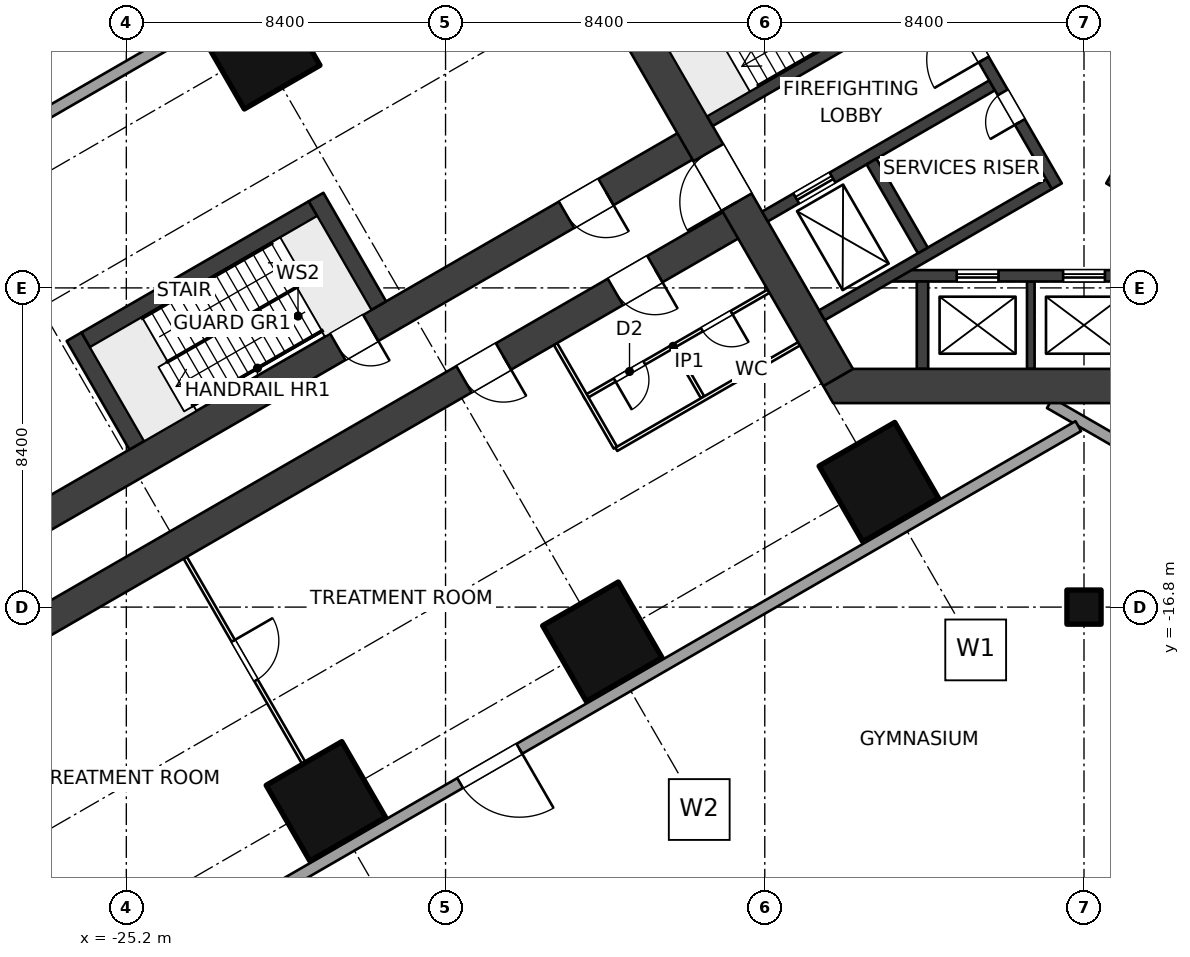
"""IFC4 building model, lengths in metres.
Left out: names, types, materials, properties, quantities, classifications, styles, units other than length and angle.
Written with IfcOpenShell. Run it as: python <this file> out.ifc"""

import sys

from ifc_helpers import new_model, si_unit, direction, frame, frame_2d, origin, origin_2d, place, context, subcontext, project, spatial, polyline, rectangle, outline, extrude, element, fill, save


model = new_model("IFC4")
c1 = context("Model", 3, precision=1e-05, world=origin(), true_north=direction((0.0, 1.0)))
c2 = subcontext(c1, "Body", "Model", "MODEL_VIEW")
j1 = project(units=[si_unit("LENGTHUNIT", "METRE"), si_unit("PLANEANGLEUNIT", "RADIAN")], contexts=[c1])
p1 = place(None, origin())
s1 = spatial("IfcSite", under=j1, at=p1, CompositionType="ELEMENT")
p2 = place(p1, origin())
s2 = spatial("IfcBuilding", under=s1, at=p2, CompositionType="ELEMENT")
p3 = place(p2, frame((0.0, 0.0, 11.0)))
s3 = spatial("IfcBuildingStorey", under=s2, at=p3, CompositionType="ELEMENT", Elevation=11.0)
for number, where, z_axis, x_axis in (
    (1, (-5.4, -13.51, 0.0), (0.0, 0.0, 1.0), (-0.5, 0.866, 0.0)),
    (2, (-12.675, -17.71, 0.0), (0.0, 0.0, 1.0), (-0.5, 0.866, 0.0)),
    (3, (-21.675, -2.122, 0.0), (0.0, 0.0, 1.0), (-0.5, 0.866, 0.0)),
    (4, (-19.949, -21.91, 0.0), (0.0, 0.0, 1.0), (-0.5, 0.866, 0.0)),
):
    element("IfcColumn", number, at=place(p3, frame(where, z_axis=z_axis, x_axis=x_axis)), inside=s3, PredefinedType="COLUMN", context=c2, shape_type="SweptSolid", body=[
        extrude(rectangle(XDim=2.3, YDim=2.3, at=origin_2d()), origin(), (0.0, 0.0, 1.0), 5.0),
    ])
p4 = place(p3, frame((0.0, -16.8, 0.0), z_axis=(0.0, 0.0, 1.0), x_axis=(1.0, 0.0, 0.0)))
e5 = element("IfcColumn", 5, at=p4, inside=s3, PredefinedType="COLUMN", context=c2, shape_type="SweptSolid", body=[
    extrude(rectangle(XDim=0.9, YDim=0.9, at=origin_2d()), origin(), (0.0, 0.0, 1.0), 5.0),
])
p5 = place(p3, frame((-6.47, -10.757, 0.0), z_axis=(0.0, 0.0, 1.0), x_axis=(-0.499997612506, 0.8660267822, 0.0)))
e6 = element("IfcWall", 6, at=p5, inside=s3, PredefinedType="SHEAR", context=c2, shape_type="SweptSolid", body=[
    extrude(rectangle(XDim=12.161, YDim=0.9, at=frame_2d((6.08, 0.0))), origin(), (0.0, 0.0, 1.0), 5.0),
])
p6 = place(p5, frame((5.33, 0.0, 0.0)))
e7 = element("IfcOpeningElement", 7, at=p6, cuts=e6, PredefinedType="OPENING", context=c2, shape_type="SweptSolid", body=[
    extrude(rectangle(XDim=1.5, YDim=2.1, at=frame_2d((0.75, 1.05))), frame((0.0, 0.46, 0.0), z_axis=(0.0, -1.0, 0.0), x_axis=(1.0, 0.0, 0.0)), (0.0, 0.0, 1.0), 0.92),
])
p7 = place(p3, origin())
e8 = element("IfcWall", 8, at=p7, inside=s3, PredefinedType="SHEAR", context=c2, shape_type="SweptSolid", body=[
    extrude(outline(polyline([(-6.6, -11.432), (6.6, -11.432), (6.86, -10.981), (6.08, -10.531), (-6.08, -10.531), (-6.86, -10.981), (-6.6, -11.432)])), origin(), (0.0, 0.0, 1.0), 5.0),
])
p8 = place(p3, frame((-0.714, -5.724, 0.0), z_axis=(0.0, 0.0, 1.0), x_axis=(-0.499995050369, 0.866028261437, 0.0)))
e9 = element("IfcWall", 9, at=p8, inside=s3, PredefinedType="SHEAR", context=c2, shape_type="SweptSolid", body=[
    extrude(rectangle(XDim=9.2, YDim=0.3, at=frame_2d((4.6, 0.0))), origin(), (0.0, 0.0, 1.0), 5.0),
])
p9 = place(p8, frame((3.85, 0.0, 0.0)))
e10 = element("IfcOpeningElement", 10, at=p9, cuts=e9, PredefinedType="OPENING", context=c2, shape_type="SweptSolid", body=[
    extrude(rectangle(XDim=1.5, YDim=2.1, at=frame_2d((0.75, 1.05))), frame((0.0, 0.16, 0.0), z_axis=(0.0, -1.0, 0.0), x_axis=(1.0, 0.0, 0.0)), (0.0, 0.0, 1.0), 0.32),
])
p10 = place(p8, frame((1.95, 0.0, 0.0)))
e11 = element("IfcOpeningElement", 11, at=p10, cuts=e9, PredefinedType="OPENING", context=c2, shape_type="SweptSolid", body=[
    extrude(rectangle(XDim=0.9, YDim=2.1, at=frame_2d((0.45, 1.05))), frame((0.0, 0.16, 0.0), z_axis=(0.0, -1.0, 0.0), x_axis=(1.0, 0.0, 0.0)), (0.0, 0.0, 1.0), 0.32),
])
p11 = place(p3, frame((-3.869, -0.559, 0.0), z_axis=(0.0, 0.0, 1.0), x_axis=(-0.86602711848, -0.499997030048, 0.0)))
e12 = element("IfcWall", 12, at=p11, inside=s3, PredefinedType="SHEAR", context=c2, shape_type="SweptSolid", body=[
    extrude(rectangle(XDim=6.901, YDim=0.3, at=frame_2d((3.451, 0.0))), origin(), (0.0, 0.0, 1.0), 5.0),
])
p12 = place(p11, frame((0.25, 0.0, 0.0)))
e13 = element("IfcOpeningElement", 13, at=p12, cuts=e12, PredefinedType="OPENING", context=c2, shape_type="SweptSolid", body=[
    extrude(rectangle(XDim=1.0, YDim=2.1, at=frame_2d((0.5, 1.05))), frame((0.0, 0.16, 0.0), z_axis=(0.0, -1.0, 0.0), x_axis=(1.0, 0.0, 0.0)), (0.0, 0.0, 1.0), 0.32),
])
p13 = place(p3, frame((-2.419, -3.071, 0.0), z_axis=(0.0, 0.0, 1.0), x_axis=(-0.86602711848, -0.499997030048, 0.0)))
e14 = element("IfcWall", 14, at=p13, inside=s3, PredefinedType="SHEAR", context=c2, shape_type="SweptSolid", body=[
    extrude(rectangle(XDim=6.901, YDim=0.3, at=frame_2d((3.451, 0.0))), origin(), (0.0, 0.0, 1.0), 5.0),
])
p14 = place(p13, frame((4.85, 0.0, 0.0)))
e15 = element("IfcOpeningElement", 15, at=p14, cuts=e14, PredefinedType="OPENING", context=c2, shape_type="SweptSolid", body=[
    extrude(rectangle(XDim=1.1, YDim=2.1, at=frame_2d((0.55, 1.05))), frame((0.0, 0.16, 0.0), z_axis=(0.0, -1.0, 0.0), x_axis=(1.0, 0.0, 0.0)), (0.0, 0.0, 1.0), 0.32),
])
p15 = place(p3, frame((-0.919, -5.669, 0.0), z_axis=(0.0, 0.0, 1.0), x_axis=(-0.866011800373, -0.500023561059, 0.0)))
e16 = element("IfcWall", 16, at=p15, inside=s3, PredefinedType="SHEAR", context=c2, shape_type="SweptSolid", body=[
    extrude(rectangle(XDim=6.902, YDim=0.3, at=frame_2d((3.451, 0.0))), origin(), (0.0, 0.0, 1.0), 5.0),
])
p16 = place(p3, frame((-4.241, -7.414, 0.0), z_axis=(0.0, 0.0, 1.0), x_axis=(-0.500048589285, 0.86599734893, 0.0)))
e17 = element("IfcWall", 17, at=p16, inside=s3, PredefinedType="SHEAR", context=c2, shape_type="SweptSolid", body=[
    extrude(rectangle(XDim=2.7, YDim=0.3, at=frame_2d((1.35, 0.0))), origin(), (0.0, 0.0, 1.0), 5.0),
])
p17 = place(p3, frame((5.314, 2.244, 0.0), z_axis=(0.0, 0.0, 1.0), x_axis=(-0.499995050369, -0.866028261437, 0.0)))
e18 = element("IfcWall", 18, at=p17, inside=s3, PredefinedType="SHEAR", context=c2, shape_type="SweptSolid", body=[
    extrude(rectangle(XDim=9.2, YDim=0.3, at=frame_2d((4.6, 0.0))), origin(), (0.0, 0.0, 1.0), 5.0),
])
p18 = place(p17, frame((3.85, 0.0, 0.0)))
e19 = element("IfcOpeningElement", 19, at=p18, cuts=e18, PredefinedType="OPENING", context=c2, shape_type="SweptSolid", body=[
    extrude(rectangle(XDim=1.5, YDim=2.1, at=frame_2d((0.75, 1.05))), frame((0.0, 0.16, 0.0), z_axis=(0.0, -1.0, 0.0), x_axis=(1.0, 0.0, 0.0)), (0.0, 0.0, 1.0), 0.32),
])
p19 = place(p17, frame((1.95, 0.0, 0.0)))
e20 = element("IfcOpeningElement", 20, at=p19, cuts=e18, PredefinedType="OPENING", context=c2, shape_type="SweptSolid", body=[
    extrude(rectangle(XDim=0.9, YDim=2.1, at=frame_2d((0.45, 1.05))), frame((0.0, 0.16, 0.0), z_axis=(0.0, -1.0, 0.0), x_axis=(1.0, 0.0, 0.0)), (0.0, 0.0, 1.0), 0.32),
])
p20 = place(p3, frame((5.098, -8.082, 0.0), z_axis=(0.0, 0.0, 1.0), x_axis=(-1.0, 0.0, 0.0)))
e21 = element("IfcWall", 21, at=p20, inside=s3, PredefinedType="SHEAR", context=c2, shape_type="SweptSolid", body=[
    extrude(rectangle(XDim=10.195, YDim=0.3, at=frame_2d((5.098, 0.0))), origin(), (0.0, 0.0, 1.0), 5.0),
])
p21 = place(p20, frame((1.748, 0.0, 0.0)))
e22 = element("IfcOpeningElement", 22, at=p21, cuts=e21, PredefinedType="OPENING", context=c2, shape_type="SweptSolid", body=[
    extrude(rectangle(XDim=1.1, YDim=2.1, at=frame_2d((0.55, 1.05))), frame((0.0, 0.16, 0.0), z_axis=(0.0, -1.0, 0.0), x_axis=(1.0, 0.0, 0.0)), (0.0, 0.0, 1.0), 0.32),
])
p22 = place(p20, frame((4.548, 0.0, 0.0)))
e23 = element("IfcOpeningElement", 23, at=p22, cuts=e21, PredefinedType="OPENING", context=c2, shape_type="SweptSolid", body=[
    extrude(rectangle(XDim=1.1, YDim=2.1, at=frame_2d((0.55, 1.05))), frame((0.0, 0.16, 0.0), z_axis=(0.0, -1.0, 0.0), x_axis=(1.0, 0.0, 0.0)), (0.0, 0.0, 1.0), 0.32),
])
p23 = place(p20, frame((7.348, 0.0, 0.0)))
e24 = element("IfcOpeningElement", 24, at=p23, cuts=e21, PredefinedType="OPENING", context=c2, shape_type="SweptSolid", body=[
    extrude(rectangle(XDim=1.1, YDim=2.1, at=frame_2d((0.55, 1.05))), frame((0.0, 0.16, 0.0), z_axis=(0.0, -1.0, 0.0), x_axis=(1.0, 0.0, 0.0)), (0.0, 0.0, 1.0), 0.32),
])
p24 = place(p3, frame((-4.25, -8.231, 0.0), z_axis=(0.0, 0.0, 1.0), x_axis=(0.0, -1.0, 0.0)))
e25 = element("IfcWall", 25, at=p24, inside=s3, PredefinedType="SHEAR", context=c2, shape_type="SweptSolid", body=[
    extrude(rectangle(XDim=2.3, YDim=0.3, at=frame_2d((1.15, 0.0))), origin(), (0.0, 0.0, 1.0), 5.0),
])
p25 = place(p3, frame((-1.4, -8.231, 0.0), z_axis=(0.0, 0.0, 1.0), x_axis=(0.0, -1.0, 0.0)))
e26 = element("IfcWall", 26, at=p25, inside=s3, PredefinedType="SHEAR", context=c2, shape_type="SweptSolid", body=[
    extrude(rectangle(XDim=2.3, YDim=0.2, at=frame_2d((1.15, 0.0))), origin(), (0.0, 0.0, 1.0), 5.0),
])
p26 = place(p3, frame((-8.91, -6.53, 0.0), z_axis=(0.0, 0.0, 1.0), x_axis=(-0.866024404313, -0.500001731131, 0.0)))
e27 = element("IfcWall", 27, at=p26, inside=s3, PredefinedType="SHEAR", context=c2, shape_type="SweptSolid", body=[
    extrude(rectangle(XDim=36.953, YDim=0.8, at=frame_2d((18.477, 0.0))), origin(), (0.0, 0.0, 1.0), 5.0),
])
p27 = place(p26, frame((2.75, 0.0, 0.0)))
e28 = element("IfcOpeningElement", 28, at=p27, cuts=e27, PredefinedType="OPENING", context=c2, shape_type="SweptSolid", body=[
    extrude(rectangle(XDim=1.2, YDim=2.1, at=frame_2d((0.6, 1.05))), frame((0.0, 0.41, 0.0), z_axis=(0.0, -1.0, 0.0), x_axis=(1.0, 0.0, 0.0)), (0.0, 0.0, 1.0), 0.82),
])
p28 = place(p26, frame((7.35, 0.0, 0.0)))
e29 = element("IfcOpeningElement", 29, at=p28, cuts=e27, PredefinedType="OPENING", context=c2, shape_type="SweptSolid", body=[
    extrude(rectangle(XDim=1.2, YDim=2.1, at=frame_2d((0.6, 1.05))), frame((0.0, 0.41, 0.0), z_axis=(0.0, -1.0, 0.0), x_axis=(1.0, 0.0, 0.0)), (0.0, 0.0, 1.0), 0.82),
])
p29 = place(p3, frame((-10.11, -4.451, 0.0), z_axis=(0.0, 0.0, 1.0), x_axis=(-0.866025284237, -0.500000207062, 0.0)))
e30 = element("IfcWall", 30, at=p29, inside=s3, PredefinedType="SHEAR", context=c2, shape_type="SweptSolid", body=[
    extrude(rectangle(XDim=36.75, YDim=0.8, at=frame_2d((18.375, 0.0))), origin(), (0.0, 0.0, 1.0), 5.0),
])
p30 = place(p29, frame((10.0, 0.0, 0.0)))
e31 = element("IfcOpeningElement", 31, at=p30, cuts=e30, PredefinedType="OPENING", context=c2, shape_type="SweptSolid", body=[
    extrude(rectangle(XDim=1.0, YDim=2.1, at=frame_2d((0.5, 1.05))), frame((0.0, 0.41, 0.0), z_axis=(0.0, -1.0, 0.0), x_axis=(1.0, 0.0, 0.0)), (0.0, 0.0, 1.0), 0.82),
])
p31 = place(p29, frame((2.85, 0.0, 0.0)))
e32 = element("IfcOpeningElement", 32, at=p31, cuts=e30, PredefinedType="OPENING", context=c2, shape_type="SweptSolid", body=[
    extrude(rectangle(XDim=1.2, YDim=2.1, at=frame_2d((0.6, 1.05))), frame((0.0, 0.41, 0.0), z_axis=(0.0, -1.0, 0.0), x_axis=(1.0, 0.0, 0.0)), (0.0, 0.0, 1.0), 0.82),
])
p32 = place(p3, frame((-8.3, -8.487, 0.0), z_axis=(0.0, 0.0, 1.0), x_axis=(-0.866015695474, -0.500016814911, 0.0)))
e33 = element("IfcWall", 33, at=p32, inside=s3, PredefinedType="PARTITIONING", context=c2, shape_type="SweptSolid", body=[
    extrude(rectangle(XDim=5.6, YDim=0.1, at=frame_2d((2.8, 0.0))), origin(), (0.0, 0.0, 1.0), 4.7),
])
p33 = place(p32, frame((1.125, 0.0, 0.0)))
e34 = element("IfcOpeningElement", 34, at=p33, cuts=e33, PredefinedType="OPENING", context=c2, shape_type="SweptSolid", body=[
    extrude(rectangle(XDim=0.9, YDim=2.1, at=frame_2d((0.45, 1.05))), frame((0.0, 0.06, 0.0), z_axis=(0.0, -1.0, 0.0), x_axis=(1.0, 0.0, 0.0)), (0.0, 0.0, 1.0), 0.12),
])
p34 = place(p32, frame((3.775, 0.0, 0.0)))
e35 = element("IfcOpeningElement", 35, at=p34, cuts=e33, PredefinedType="OPENING", context=c2, shape_type="SweptSolid", body=[
    extrude(rectangle(XDim=0.9, YDim=2.1, at=frame_2d((0.45, 1.05))), frame((0.0, 0.06, 0.0), z_axis=(0.0, -1.0, 0.0), x_axis=(1.0, 0.0, 0.0)), (0.0, 0.0, 1.0), 0.12),
])
p35 = place(p3, frame((-10.786, -9.98, 0.0), z_axis=(0.0, 0.0, 1.0), x_axis=(0.500060622324, -0.86599040064, 0.0)))
e36 = element("IfcWall", 36, at=p35, inside=s3, PredefinedType="PARTITIONING", context=c2, shape_type="SweptSolid", body=[
    extrude(rectangle(XDim=1.5, YDim=0.1, at=frame_2d((0.75, 0.0))), origin(), (0.0, 0.0, 1.0), 4.7),
])
p36 = place(p3, frame((-7.5, -9.873, 0.0), z_axis=(0.0, 0.0, 1.0), x_axis=(-0.866031018186, -0.499990275446, 0.0)))
e37 = element("IfcWall", 37, at=p36, inside=s3, PredefinedType="PARTITIONING", context=c2, shape_type="SweptSolid", body=[
    extrude(rectangle(XDim=5.55, YDim=0.1, at=frame_2d((2.775, 0.0))), origin(), (0.0, 0.0, 1.0), 4.7),
])
p37 = place(p3, frame((-13.906, -9.876, 0.0), z_axis=(0.0, 0.0, 1.0), x_axis=(0.499981869177, -0.866035871367, 0.0)))
e38 = element("IfcWall", 38, at=p37, inside=s3, PredefinedType="PARTITIONING", context=c2, shape_type="SweptSolid", body=[
    extrude(rectangle(XDim=3.15, YDim=0.1, at=frame_2d((1.575, 0.0))), origin(), (0.0, 0.0, 1.0), 4.7),
])
p38 = place(p3, frame((-23.649, -15.501, 0.0), z_axis=(0.0, 0.0, 1.0), x_axis=(0.500004234368, -0.866022959057, 0.0)))
e39 = element("IfcWall", 39, at=p38, inside=s3, PredefinedType="PARTITIONING", context=c2, shape_type="SweptSolid", body=[
    extrude(rectangle(XDim=6.25, YDim=0.1, at=frame_2d((3.125, 0.0))), origin(), (0.0, 0.0, 1.0), 2.9),
])
p39 = place(p38, frame((2.525, 0.0, 0.0)))
e40 = element("IfcOpeningElement", 40, at=p39, cuts=e39, PredefinedType="OPENING", context=c2, shape_type="SweptSolid", body=[
    extrude(rectangle(XDim=1.2, YDim=2.1, at=frame_2d((0.6, 1.05))), frame((0.0, 0.06, 0.0), z_axis=(0.0, -1.0, 0.0), x_axis=(1.0, 0.0, 0.0)), (0.0, 0.0, 1.0), 0.12),
])
p40 = place(p3, frame((-0.15, -12.038, 0.0), z_axis=(0.0, 0.0, 1.0), x_axis=(-0.866030473254, -0.499991219318, 0.0)))
e41 = element("IfcWall", 41, at=p40, inside=s3, PredefinedType="SOLIDWALL", context=c2, shape_type="SweptSolid", body=[
    extrude(rectangle(XDim=25.739, YDim=0.3, at=frame_2d((12.869, 0.0))), origin(), (0.0, 0.0, 1.0), 4.7),
])
p41 = place(p40, frame((16.983, 0.0, 0.0)))
e42 = element("IfcOpeningElement", 42, at=p41, cuts=e41, PredefinedType="OPENING", context=c2, shape_type="SweptSolid", body=[
    extrude(rectangle(XDim=1.8, YDim=2.4, at=frame_2d((0.9, 1.2))), frame((0.0, 0.16, 0.0), z_axis=(0.0, -1.0, 0.0), x_axis=(1.0, 0.0, 0.0)), (0.0, 0.0, 1.0), 0.32),
])
p42 = place(p3, frame((-9.45, 6.495, 0.0), z_axis=(0.0, 0.0, 1.0), x_axis=(-0.866025301493, -0.500000177174, 0.0)))
e43 = element("IfcWall", 43, at=p42, inside=s3, PredefinedType="SOLIDWALL", context=c2, shape_type="SweptSolid", body=[
    extrude(rectangle(XDim=43.095, YDim=0.3, at=frame_2d((21.548, 0.0))), origin(), (0.0, 0.0, 1.0), 4.7),
])
p43 = place(p42, frame((26.595, 0.0, 0.0)))
e44 = element("IfcOpeningElement", 44, at=p43, cuts=e43, PredefinedType="OPENING", context=c2, shape_type="SweptSolid", body=[
    extrude(rectangle(XDim=1.8, YDim=2.4, at=frame_2d((0.9, 1.2))), frame((0.0, 0.16, 0.0), z_axis=(0.0, -1.0, 0.0), x_axis=(1.0, 0.0, 0.0)), (0.0, 0.0, 1.0), 0.32),
])
p44 = place(p3, frame((-0.9, -11.432, 0.0), z_axis=(0.0, 0.0, 1.0), x_axis=(0.866028700395, -0.49999429006, 0.0)))
e45 = element("IfcWall", 45, at=p44, inside=s3, PredefinedType="SOLIDWALL", context=c2, shape_type="SweptSolid", body=[
    extrude(rectangle(XDim=26.951, YDim=0.3, at=frame_2d((13.476, 0.0))), origin(), (0.0, 0.0, 1.0), 4.7),
])
p45 = place(p44, frame((18.195, 0.0, 0.0)))
e46 = element("IfcOpeningElement", 46, at=p45, cuts=e45, PredefinedType="OPENING", context=c2, shape_type="SweptSolid", body=[
    extrude(rectangle(XDim=1.8, YDim=2.4, at=frame_2d((0.9, 1.2))), frame((0.0, 0.16, 0.0), z_axis=(0.0, -1.0, 0.0), x_axis=(1.0, 0.0, 0.0)), (0.0, 0.0, 1.0), 0.32),
])
for number, where, z_axis, x_axis in (
    (47, (-18.559, -8.868, 0.0), (0.0, 0.0, 1.0), (-0.5, 0.866, 0.0)),
    (48, (-24.925, -12.543, 0.0), (0.0, 0.0, 1.0), (-0.5, 0.866, 0.0)),
):
    element("IfcWall", number, at=place(p3, frame(where, z_axis=z_axis, x_axis=x_axis)), inside=s3, PredefinedType="SOLIDWALL", context=c2, shape_type="SweptSolid", body=[
        extrude(rectangle(XDim=3.3, YDim=0.45, at=frame_2d((1.65, 0.0))), origin(), (0.0, 0.0, 1.0), 5.0),
    ])
p46 = place(p3, frame((-20.292, -6.317, 0.0), z_axis=(0.0, 0.0, 1.0), x_axis=(-0.866028853923, -0.499994024137, 0.0)))
e49 = element("IfcWall", 49, at=p46, inside=s3, PredefinedType="SOLIDWALL", context=c2, shape_type="SweptSolid", body=[
    extrude(rectangle(XDim=6.9, YDim=0.45, at=frame_2d((3.45, 0.0))), origin(), (0.0, 0.0, 1.0), 5.0),
])
p47 = place(p22, origin())
e50 = element("IfcDoor", 50, at=p47, inside=s3, OperationType="DOUBLE_DOOR_SLIDING", PredefinedType="DOOR", context=c2, shape_type="SweptSolid", body=[
    extrude(rectangle(XDim=1.1, YDim=2.1, at=frame_2d((0.55, 1.05))), frame((0.0, 0.025, 0.0), z_axis=(0.0, -1.0, 0.0), x_axis=(1.0, 0.0, 0.0)), (0.0, 0.0, 1.0), 0.05),
])
fill(e23, e50)
p48 = place(p23, origin())
e51 = element("IfcDoor", 51, at=p48, inside=s3, OperationType="DOUBLE_DOOR_SLIDING", PredefinedType="DOOR", context=c2, shape_type="SweptSolid", body=[
    extrude(rectangle(XDim=1.1, YDim=2.1, at=frame_2d((0.55, 1.05))), frame((0.0, 0.025, 0.0), z_axis=(0.0, -1.0, 0.0), x_axis=(1.0, 0.0, 0.0)), (0.0, 0.0, 1.0), 0.05),
])
fill(e24, e51)
p49 = place(p14, origin())
e52 = element("IfcDoor", 52, at=p49, inside=s3, OperationType="DOUBLE_DOOR_SLIDING", PredefinedType="DOOR", context=c2, shape_type="SweptSolid", body=[
    extrude(rectangle(XDim=1.1, YDim=2.1, at=frame_2d((0.55, 1.05))), frame((0.0, 0.025, 0.0), z_axis=(0.0, -1.0, 0.0), x_axis=(1.0, 0.0, 0.0)), (0.0, 0.0, 1.0), 0.05),
])
fill(e15, e52)
p50 = place(p9, origin())
e53 = element("IfcDoor", 53, at=p50, inside=s3, OperationType="DOUBLE_DOOR_DOUBLE_SWING", PredefinedType="DOOR", context=c2, shape_type="SweptSolid", body=[
    extrude(rectangle(XDim=1.5, YDim=2.1, at=frame_2d((0.75, 1.05))), frame((0.0, 0.025, 0.0), z_axis=(0.0, -1.0, 0.0), x_axis=(1.0, 0.0, 0.0)), (0.0, 0.0, 1.0), 0.05),
])
fill(e10, e53)
p51 = place(p10, origin())
e54 = element("IfcDoor", 54, at=p51, inside=s3, OperationType="SINGLE_SWING_LEFT", PredefinedType="DOOR", context=c2, shape_type="SweptSolid", body=[
    extrude(rectangle(XDim=0.9, YDim=2.1, at=frame_2d((0.45, 1.05))), frame((0.0, 0.025, 0.0), z_axis=(0.0, -1.0, 0.0), x_axis=(1.0, 0.0, 0.0)), (0.0, 0.0, 1.0), 0.05),
])
fill(e11, e54)
p52 = place(p6, origin())
e55 = element("IfcDoor", 55, at=p52, inside=s3, OperationType="DOUBLE_DOOR_DOUBLE_SWING", PredefinedType="DOOR", context=c2, shape_type="SweptSolid", body=[
    extrude(rectangle(XDim=1.5, YDim=2.1, at=frame_2d((0.75, 1.05))), frame((0.0, 0.025, 0.0), z_axis=(0.0, -1.0, 0.0), x_axis=(1.0, 0.0, 0.0)), (0.0, 0.0, 1.0), 0.05),
])
fill(e7, e55)
p53 = place(p30, origin())
e56 = element("IfcDoor", 56, at=p53, inside=s3, OperationType="SINGLE_SWING_LEFT", PredefinedType="DOOR", context=c2, shape_type="SweptSolid", body=[
    extrude(rectangle(XDim=1.0, YDim=2.1, at=frame_2d((0.5, 1.05))), frame((0.0, 0.025, 0.0), z_axis=(0.0, -1.0, 0.0), x_axis=(1.0, 0.0, 0.0)), (0.0, 0.0, 1.0), 0.05),
])
fill(e31, e56)
p54 = place(p33, origin())
e57 = element("IfcDoor", 57, at=p54, inside=s3, OperationType="SINGLE_SWING_LEFT", PredefinedType="DOOR", context=c2, shape_type="SweptSolid", body=[
    extrude(rectangle(XDim=0.9, YDim=2.1, at=frame_2d((0.45, 1.05))), frame((0.0, 0.025, 0.0), z_axis=(0.0, -1.0, 0.0), x_axis=(1.0, 0.0, 0.0)), (0.0, 0.0, 1.0), 0.05),
])
fill(e34, e57)
p55 = place(p34, origin())
e58 = element("IfcDoor", 58, at=p55, inside=s3, OperationType="SINGLE_SWING_RIGHT", PredefinedType="DOOR", context=c2, shape_type="SweptSolid", body=[
    extrude(rectangle(XDim=0.9, YDim=2.1, at=frame_2d((0.45, 1.05))), frame((0.0, 0.025, 0.0), z_axis=(0.0, -1.0, 0.0), x_axis=(1.0, 0.0, 0.0)), (0.0, 0.0, 1.0), 0.05),
])
fill(e35, e58)
p56 = place(p27, origin())
e59 = element("IfcDoor", 59, at=p56, inside=s3, OperationType="DOUBLE_SWING_LEFT", PredefinedType="DOOR", context=c2, shape_type="SweptSolid", body=[
    extrude(rectangle(XDim=1.2, YDim=2.1, at=frame_2d((0.6, 1.05))), frame((0.0, 0.025, 0.0), z_axis=(0.0, -1.0, 0.0), x_axis=(1.0, 0.0, 0.0)), (0.0, 0.0, 1.0), 0.05),
])
fill(e28, e59)
p57 = place(p39, origin())
e60 = element("IfcDoor", 60, at=p57, inside=s3, OperationType="DOUBLE_SWING_LEFT", PredefinedType="DOOR", context=c2, shape_type="SweptSolid", body=[
    extrude(rectangle(XDim=1.2, YDim=2.1, at=frame_2d((0.6, 1.05))), frame((0.0, 0.025, 0.0), z_axis=(0.0, -1.0, 0.0), x_axis=(1.0, 0.0, 0.0)), (0.0, 0.0, 1.0), 0.05),
])
fill(e40, e60)
p58 = place(p28, origin())
e61 = element("IfcDoor", 61, at=p58, inside=s3, OperationType="DOUBLE_SWING_LEFT", PredefinedType="DOOR", context=c2, shape_type="SweptSolid", body=[
    extrude(rectangle(XDim=1.2, YDim=2.1, at=frame_2d((0.6, 1.05))), frame((0.0, 0.025, 0.0), z_axis=(0.0, -1.0, 0.0), x_axis=(1.0, 0.0, 0.0)), (0.0, 0.0, 1.0), 0.05),
])
fill(e29, e61)
p59 = place(p31, origin())
e62 = element("IfcDoor", 62, at=p59, inside=s3, OperationType="DOUBLE_SWING_LEFT", PredefinedType="DOOR", context=c2, shape_type="SweptSolid", body=[
    extrude(rectangle(XDim=1.2, YDim=2.1, at=frame_2d((0.6, 1.05))), frame((0.0, 0.025, 0.0), z_axis=(0.0, -1.0, 0.0), x_axis=(1.0, 0.0, 0.0)), (0.0, 0.0, 1.0), 0.05),
])
fill(e32, e62)
p60 = place(p41, origin())
e63 = element("IfcDoor", 63, at=p60, inside=s3, OperationType="DOUBLE_DOOR_DOUBLE_SWING", PredefinedType="DOOR", context=c2, shape_type="SweptSolid", body=[
    extrude(rectangle(XDim=1.8, YDim=2.4, at=frame_2d((0.9, 1.2))), frame((0.0, 0.025, 0.0), z_axis=(0.0, -1.0, 0.0), x_axis=(1.0, 0.0, 0.0)), (0.0, 0.0, 1.0), 0.05),
])
fill(e42, e63)
save(model, sys.argv[1])
